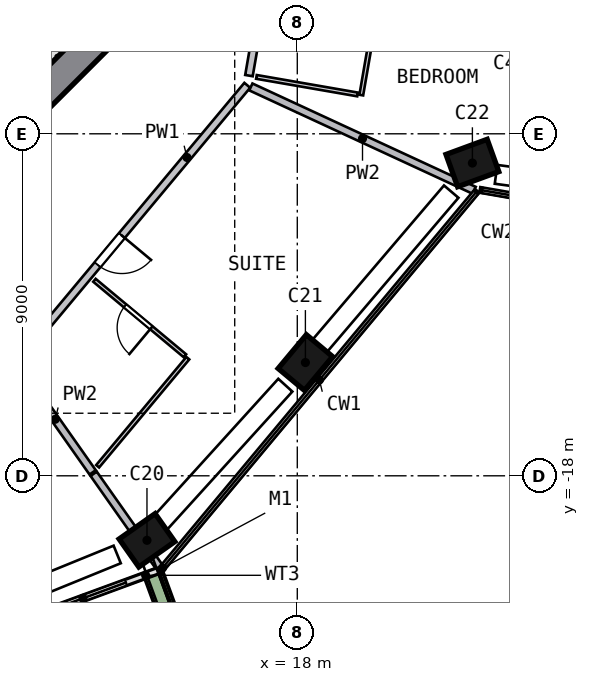
"""IFC4 building model, lengths in metres.
Left out: names, types, materials, properties, quantities, classifications, styles, units other than length and angle.
Written with IfcOpenShell. Run it as: python <this file> out.ifc"""

import sys

from ifc_helpers import new_model, si_unit, direction, frame, frame_2d, origin, origin_2d, place, context, subcontext, project, spatial, rectangle, extrude, element, fill, save


model = new_model("IFC4")
c1 = context("Model", 3, precision=1e-05, world=origin(), true_north=direction((0.0, 1.0)))
c2 = subcontext(c1, "Body", "Model", "MODEL_VIEW")
j1 = project(units=[si_unit("LENGTHUNIT", "METRE"), si_unit("PLANEANGLEUNIT", "RADIAN")], contexts=[c1])
p1 = place(None, origin())
s1 = spatial("IfcSite", under=j1, at=p1, CompositionType="ELEMENT")
p2 = place(p1, origin())
s2 = spatial("IfcBuilding", under=s1, at=p2, CompositionType="ELEMENT")
p3 = place(p2, frame((0.0, 0.0, 115.0)))
s3 = spatial("IfcBuildingStorey", under=s2, at=p3, CompositionType="ELEMENT", Elevation=115.0)
p4 = place(p3, frame((13.932, -19.779, 0.0), z_axis=(0.093512147, 0.067055052, 0.993357488), x_axis=(-0.812148283, -0.571992313, 0.115065024)))
e1 = element("IfcColumn", 1, at=p4, inside=s3, PredefinedType="COLUMN", context=c2, shape_type="SweptSolid", body=[
    extrude(rectangle(XDim=1.15, YDim=0.9, at=origin_2d()), origin(), (0.0, 0.0, 1.0), 3.211),
])
p5 = place(p3, frame((18.127, -15.125, 0.0), z_axis=(0.071258876, 0.086849132, 0.993669664), x_axis=(0.636786768, 0.7628125, -0.112337447)))
e2 = element("IfcColumn", 2, at=p5, inside=s3, PredefinedType="COLUMN", context=c2, shape_type="SweptSolid", body=[
    extrude(rectangle(XDim=1.15, YDim=0.9, at=origin_2d()), origin(), (0.0, 0.0, 1.0), 3.21),
])
p6 = place(p3, frame((22.552, -9.9, 0.0), z_axis=(0.046136841, 0.107627294, 0.993120213), x_axis=(-0.937960416, -0.337355481, 0.080134497)))
e3 = element("IfcColumn", 3, at=p6, inside=s3, PredefinedType="COLUMN", context=c2, shape_type="SweptSolid", body=[
    extrude(rectangle(XDim=1.15, YDim=0.9, at=origin_2d()), origin(), (0.0, 0.0, 1.0), 3.212),
])
p7 = place(p3, frame((5.516, -13.717, 0.0), z_axis=(0.0, 0.0, 1.0), x_axis=(0.707106781, 0.707106781, 0.0)))
e4 = element("IfcWall", 4, at=p7, inside=s3, PredefinedType="SHEAR", context=c2, shape_type="SweptSolid", body=[
    extrude(rectangle(XDim=11.598, YDim=0.8, at=frame_2d((5.799, 0.0))), origin(), (0.0, 0.0, 1.0), 3.5),
])
p8 = place(p7, frame((2.099, 0.0, 0.0)))
e5 = element("IfcOpeningElement", 5, at=p8, cuts=e4, PredefinedType="OPENING", context=c2, shape_type="SweptSolid", body=[
    extrude(rectangle(XDim=1.2, YDim=2.1, at=frame_2d((0.6, 1.05))), frame((0.0, 0.41, 0.0), z_axis=(0.0, -1.0, 0.0), x_axis=(1.0, 0.0, 0.0)), (0.0, 0.0, 1.0), 0.82),
])
p9 = place(p3, frame((10.859, -21.775, 0.0), z_axis=(0.0, 0.0, 1.0), x_axis=(0.938745803, 0.344610386, 0.0)))
e6 = element("IfcWall", 6, at=p9, inside=s3, PredefinedType="SOLIDWALL", context=c2, shape_type="SweptSolid", body=[
    extrude(rectangle(XDim=3.71, YDim=0.15, at=frame_2d((1.855, 0.0))), origin(), (0.0, 0.0, 1.0), 2.425),
])
p10 = place(p9, frame((0.4, 0.0, 0.0)))
e7 = element("IfcOpeningElement", 7, at=p10, cuts=e6, PredefinedType="OPENING", context=c2, shape_type="SweptSolid", body=[
    extrude(rectangle(XDim=2.4, YDim=2.4, at=frame_2d((1.2, 1.2))), frame((0.0, 0.085, 0.0), z_axis=(0.0, -1.0, 0.0), x_axis=(1.0, 0.0, 0.0)), (0.0, 0.0, 1.0), 0.17),
])
p11 = place(p3, frame((15.158, -23.153, 0.0), z_axis=(0.0, 0.0, 1.0), x_axis=(-0.344741011, 0.93869784, 0.0)))
e8 = element("IfcWall", 8, at=p11, inside=s3, PredefinedType="SOLIDWALL", context=c2, shape_type="SweptSolid", body=[
    extrude(rectangle(XDim=2.699, YDim=0.5, at=frame_2d((1.35, 0.0))), origin(), (0.0, 0.0, 1.0), 0.7),
])
p12 = place(p3, frame((16.684, -7.723, 0.0), z_axis=(0.0, 0.0, 1.0), x_axis=(-0.640640516, -0.767840953, 0.0)))
e9 = element("IfcWall", 9, at=p12, inside=s3, PredefinedType="SOLIDWALL", context=c2, shape_type="SweptSolid", body=[
    extrude(rectangle(XDim=9.316, YDim=0.2, at=frame_2d((4.658, 0.0))), origin(), (0.0, 0.0, 1.0), 3.19),
])
p13 = place(p12, frame((5.15, 0.0, 0.0)))
e10 = element("IfcOpeningElement", 10, at=p13, cuts=e9, PredefinedType="OPENING", context=c2, shape_type="SweptSolid", body=[
    extrude(rectangle(XDim=1.0, YDim=2.1, at=frame_2d((0.5, 1.05))), frame((0.0, 0.11, 0.0), z_axis=(0.0, -1.0, 0.0), x_axis=(1.0, 0.0, 0.0)), (0.0, 0.0, 1.0), 0.22),
])
p14 = place(p3, frame((16.728, -7.469, 0.0), z_axis=(0.0, 0.0, 1.0), x_axis=(0.170892681, 0.985289649, 0.0)))
e11 = element("IfcWall", 11, at=p14, inside=s3, PredefinedType="SOLIDWALL", context=c2, shape_type="SweptSolid", body=[
    extrude(rectangle(XDim=3.4, YDim=0.2, at=frame_2d((1.7, 0.0))), origin(), (0.0, 0.0, 1.0), 3.19),
])
p15 = place(p3, frame((10.647, -15.115, 0.0), z_axis=(0.0, 0.0, 1.0), x_axis=(0.575827703, -0.817571071, 0.0)))
e12 = element("IfcWall", 12, at=p15, inside=s3, PredefinedType="SOLIDWALL", context=c2, shape_type="SweptSolid", body=[
    extrude(rectangle(XDim=3.418, YDim=0.2, at=frame_2d((1.709, 0.0))), origin(), (0.0, 0.0, 1.0), 3.19),
])
p16 = place(p3, frame((12.642, -17.947, 0.0), z_axis=(0.0, 0.0, 1.0), x_axis=(0.575919056, -0.817506723, 0.0)))
e13 = element("IfcWall", 13, at=p16, inside=s3, PredefinedType="SOLIDWALL", context=c2, shape_type="SweptSolid", body=[
    extrude(rectangle(XDim=3.011, YDim=0.2, at=frame_2d((1.506, 0.0))), origin(), (0.0, 0.0, 1.0), 3.19),
])
p17 = place(p3, frame((16.778, -7.767, 0.0), z_axis=(0.0, 0.0, 1.0), x_axis=(0.907481014, -0.420093097, 0.0)))
e14 = element("IfcWall", 14, at=p17, inside=s3, PredefinedType="SOLIDWALL", context=c2, shape_type="SweptSolid", body=[
    extrude(rectangle(XDim=6.476, YDim=0.2, at=frame_2d((3.238, 0.0))), origin(), (0.0, 0.0, 1.0), 3.19),
])
p18 = place(p3, frame((15.043, -14.841, 0.0), z_axis=(0.0, 0.0, 1.0), x_axis=(-0.767833833, 0.64064905, 0.0)))
e15 = element("IfcWall", 15, at=p18, inside=s3, PredefinedType="PARTITIONING", context=c2, shape_type="SweptSolid", body=[
    extrude(rectangle(XDim=3.1, YDim=0.1, at=frame_2d((1.55, 0.0))), origin(), (0.0, 0.0, 1.0), 3.19),
])
p19 = place(p18, frame((1.15, 0.0, 0.0)))
e16 = element("IfcOpeningElement", 16, at=p19, cuts=e15, PredefinedType="OPENING", context=c2, shape_type="SweptSolid", body=[
    extrude(rectangle(XDim=0.9, YDim=2.1, at=frame_2d((0.45, 1.05))), frame((0.0, 0.06, 0.0), z_axis=(0.0, -1.0, 0.0), x_axis=(1.0, 0.0, 0.0)), (0.0, 0.0, 1.0), 0.12),
])
p20 = place(p3, frame((15.12, -14.905, 0.0), z_axis=(0.0, 0.0, 1.0), x_axis=(-0.640638089, -0.767842978, 0.0)))
e17 = element("IfcWall", 17, at=p20, inside=s3, PredefinedType="PARTITIONING", context=c2, shape_type="SweptSolid", body=[
    extrude(rectangle(XDim=3.704, YDim=0.1, at=frame_2d((1.852, 0.0))), origin(), (0.0, 0.0, 1.0), 3.19),
])
p21 = place(p3, frame((16.925, -7.503, 0.0), z_axis=(0.0, 0.0, 1.0), x_axis=(0.985274731, -0.170978665, 0.0)))
e18 = element("IfcWall", 18, at=p21, inside=s3, PredefinedType="PARTITIONING", context=c2, shape_type="SweptSolid", body=[
    extrude(rectangle(XDim=2.7, YDim=0.1, at=frame_2d((1.35, 0.0))), origin(), (0.0, 0.0, 1.0), 3.19),
])
p22 = place(p3, frame((19.684, -7.981, 0.0), z_axis=(0.0, 0.0, 1.0), x_axis=(0.17090326, 0.985287814, 0.0)))
e19 = element("IfcWall", 19, at=p22, inside=s3, PredefinedType="PARTITIONING", context=c2, shape_type="SweptSolid", body=[
    extrude(rectangle(XDim=3.2, YDim=0.1, at=frame_2d((1.6, 0.0))), origin(), (0.0, 0.0, 1.0), 3.19),
])
p23 = place(p22, frame((1.25, 0.0, 0.0)))
e20 = element("IfcOpeningElement", 20, at=p23, cuts=e19, PredefinedType="OPENING", context=c2, shape_type="SweptSolid", body=[
    extrude(rectangle(XDim=0.9, YDim=2.1, at=frame_2d((0.45, 1.05))), frame((0.0, 0.06, 0.0), z_axis=(0.0, -1.0, 0.0), x_axis=(1.0, 0.0, 0.0)), (0.0, 0.0, 1.0), 0.12),
])
p24 = place(p10, origin())
e21 = element("IfcDoor", 21, at=p24, inside=s3, OperationType="SLIDING_TO_RIGHT", PredefinedType="DOOR", context=c2, shape_type="SweptSolid", body=[
    extrude(rectangle(XDim=2.4, YDim=2.4, at=frame_2d((1.2, 1.2))), frame((0.0, 0.025, 0.0), z_axis=(0.0, -1.0, 0.0), x_axis=(1.0, 0.0, 0.0)), (0.0, 0.0, 1.0), 0.05),
])
fill(e7, e21)
p25 = place(p13, origin())
e22 = element("IfcDoor", 22, at=p25, inside=s3, OperationType="SINGLE_SWING_LEFT", PredefinedType="DOOR", context=c2, shape_type="SweptSolid", body=[
    extrude(rectangle(XDim=1.0, YDim=2.1, at=frame_2d((0.5, 1.05))), frame((0.0, 0.025, 0.0), z_axis=(0.0, -1.0, 0.0), x_axis=(1.0, 0.0, 0.0)), (0.0, 0.0, 1.0), 0.05),
])
fill(e10, e22)
p26 = place(p19, origin())
e23 = element("IfcDoor", 23, at=p26, inside=s3, OperationType="SINGLE_SWING_LEFT", PredefinedType="DOOR", context=c2, shape_type="SweptSolid", body=[
    extrude(rectangle(XDim=0.9, YDim=2.1, at=frame_2d((0.45, 1.05))), frame((0.0, 0.025, 0.0), z_axis=(0.0, -1.0, 0.0), x_axis=(1.0, 0.0, 0.0)), (0.0, 0.0, 1.0), 0.05),
])
fill(e16, e23)
save(model, sys.argv[1])
